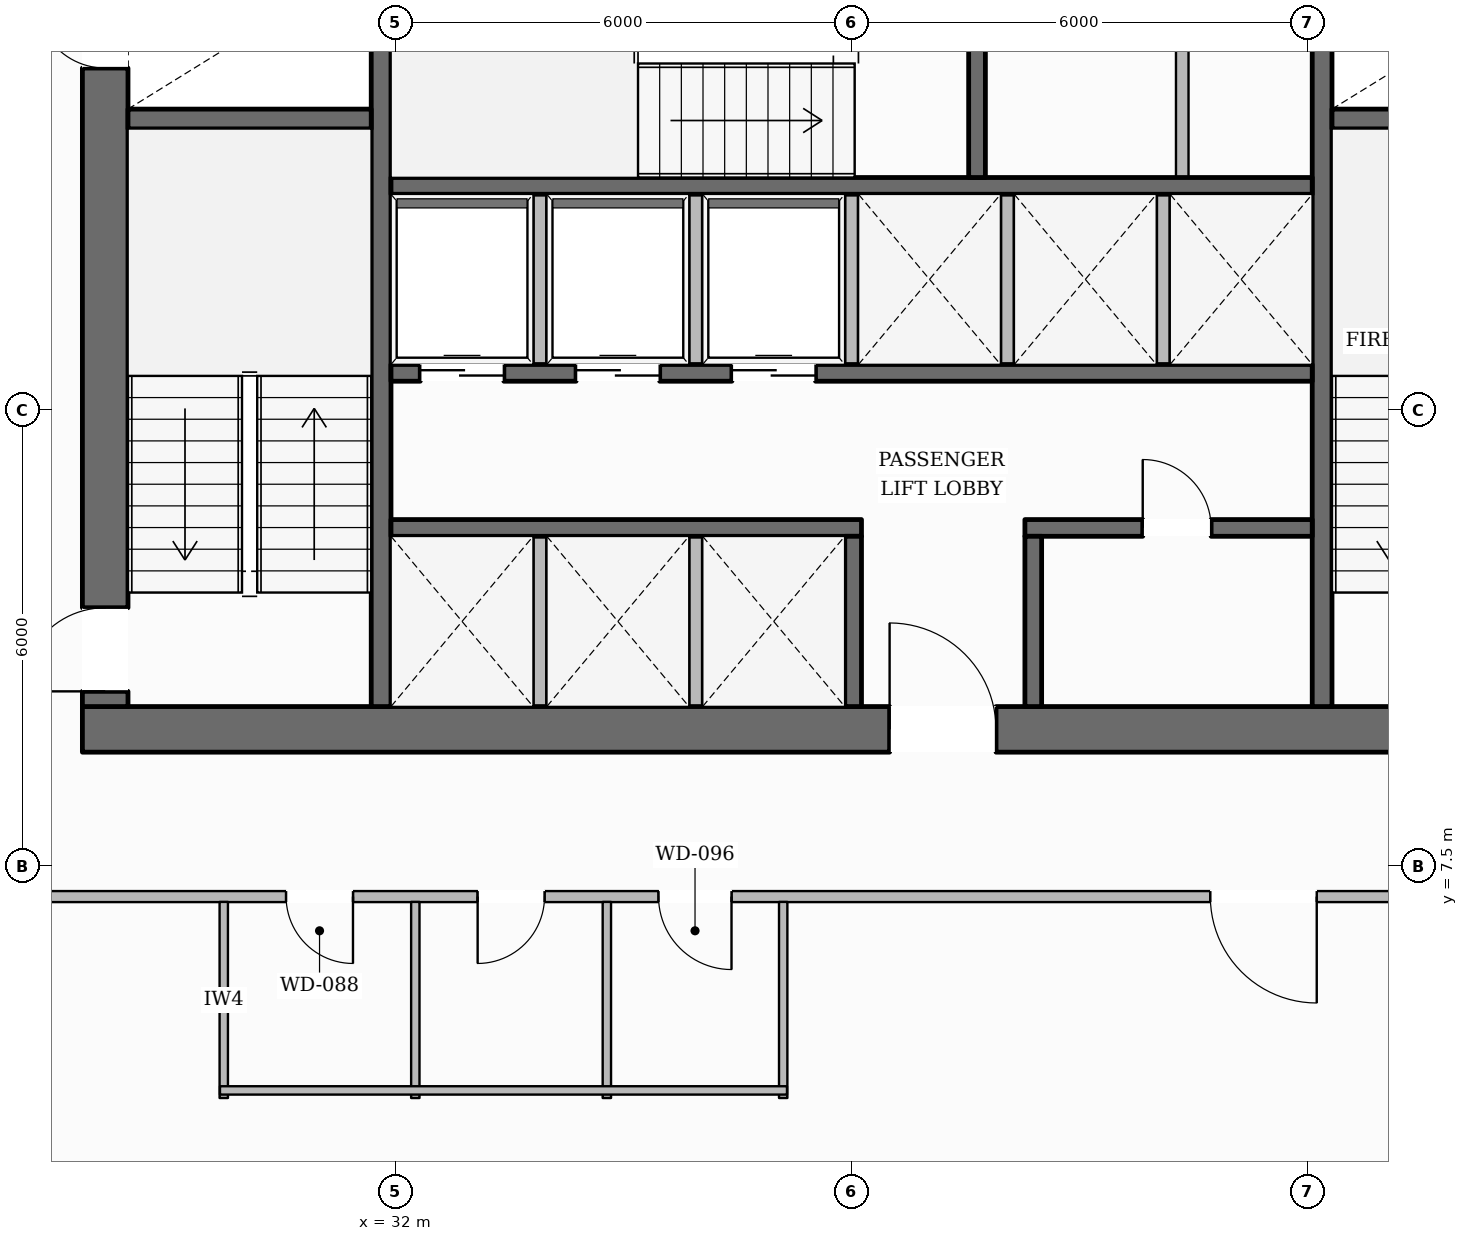
"""IFC4 building model, lengths in metres.
Left out: names, types, materials, properties, quantities, classifications, styles, units other than length and angle.
Written with IfcOpenShell. Run it as: python <this file> out.ifc"""

import sys

from ifc_helpers import new_model, si_unit, direction, frame, frame_2d, origin, place, context, subcontext, project, spatial, rectangle, extrude, element, fill, save


model = new_model("IFC4")
c1 = context("Model", 3, precision=1e-05, world=origin(), true_north=direction((0.0, 1.0)))
c2 = subcontext(c1, "Body", "Model", "MODEL_VIEW")
j1 = project(units=[si_unit("LENGTHUNIT", "METRE"), si_unit("PLANEANGLEUNIT", "RADIAN")], contexts=[c1])
p1 = place(None, origin())
s1 = spatial("IfcSite", under=j1, at=p1, CompositionType="ELEMENT")
p2 = place(p1, origin())
s2 = spatial("IfcBuilding", under=s1, at=p2, CompositionType="ELEMENT")
p3 = place(p2, frame((0.0, 0.0, 9.85)))
s3 = spatial("IfcBuildingStorey", under=s2, at=p3, CompositionType="ELEMENT", Elevation=9.85)
p4 = place(p3, frame((27.88, 9.3, 0.0), z_axis=(0.0, 0.0, 1.0), x_axis=(1.0, 0.0, 0.0)))
e1 = element("IfcWall", 1, at=p4, inside=s3, PredefinedType="SOLIDWALL", context=c2, shape_type="SweptSolid", body=[
    extrude(rectangle(XDim=20.24, YDim=0.6, at=frame_2d((10.12, 0.0))), origin(), (0.0, 0.0, 1.0), 3.59),
])
p5 = place(p4, frame((10.62, 0.0, 0.0)))
e2 = element("IfcOpeningElement", 2, at=p5, cuts=e1, PredefinedType="OPENING", context=c2, shape_type="SweptSolid", body=[
    extrude(rectangle(XDim=1.4, YDim=2.2, at=frame_2d((0.7, 1.1))), frame((0.0, 0.31, 0.0), z_axis=(0.0, -1.0, 0.0), x_axis=(1.0, 0.0, 0.0)), (0.0, 0.0, 1.0), 0.62),
])
p6 = place(p3, frame((28.18, 9.6, 0.0), z_axis=(0.0, 0.0, 1.0), x_axis=(0.0, 1.0, 0.0)))
e3 = element("IfcWall", 3, at=p6, inside=s3, PredefinedType="SOLIDWALL", context=c2, shape_type="SweptSolid", body=[
    extrude(rectangle(XDim=13.0, YDim=0.6, at=frame_2d((6.5, 0.0))), origin(), (0.0, 0.0, 1.0), 3.59),
])
p7 = place(p6, frame((0.2, 0.0, 0.0)))
e4 = element("IfcOpeningElement", 4, at=p7, cuts=e3, PredefinedType="OPENING", context=c2, shape_type="SweptSolid", body=[
    extrude(rectangle(XDim=1.1, YDim=2.15, at=frame_2d((0.55, 1.075))), frame((0.0, 0.31, 0.0), z_axis=(0.0, -1.0, 0.0), x_axis=(1.0, 0.0, 0.0)), (0.0, 0.0, 1.0), 0.62),
])
p8 = place(p6, frame((8.4, 0.0, 0.0)))
e5 = element("IfcOpeningElement", 5, at=p8, cuts=e3, PredefinedType="OPENING", context=c2, shape_type="SweptSolid", body=[
    extrude(rectangle(XDim=0.9, YDim=2.1, at=frame_2d((0.45, 1.05))), frame((0.0, 0.31, 0.0), z_axis=(0.0, -1.0, 0.0), x_axis=(1.0, 0.0, 0.0)), (0.0, 0.0, 1.0), 0.62),
])
p9 = place(p3, frame((31.81, 9.6, 0.0), z_axis=(0.0, 0.0, 1.0), x_axis=(0.0, 1.0, 0.0)))
e6 = element("IfcWall", 6, at=p9, inside=s3, PredefinedType="SHEAR", context=c2, shape_type="SweptSolid", body=[
    extrude(rectangle(XDim=13.0, YDim=0.26, at=frame_2d((6.5, 0.0))), origin(), (0.0, 0.0, 1.0), 3.59),
])
p10 = place(p9, frame((10.925, 0.0, 0.0)))
e7 = element("IfcOpeningElement", 7, at=p10, cuts=e6, PredefinedType="OPENING", context=c2, shape_type="SweptSolid", body=[
    extrude(rectangle(XDim=1.25, YDim=2.25, at=frame_2d((0.625, 1.125))), frame((0.0, 0.14, 0.0), z_axis=(0.0, -1.0, 0.0), x_axis=(1.0, 0.0, 0.0)), (0.0, 0.0, 1.0), 0.28),
])
p11 = place(p3, frame((44.19, 9.6, 0.0), z_axis=(0.0, 0.0, 1.0), x_axis=(0.0, 1.0, 0.0)))
e8 = element("IfcWall", 8, at=p11, inside=s3, PredefinedType="SHEAR", context=c2, shape_type="SweptSolid", body=[
    extrude(rectangle(XDim=13.0, YDim=0.26, at=frame_2d((6.5, 0.0))), origin(), (0.0, 0.0, 1.0), 3.59),
])
p12 = place(p11, frame((10.925, 0.0, 0.0)))
e9 = element("IfcOpeningElement", 9, at=p12, cuts=e8, PredefinedType="OPENING", context=c2, shape_type="SweptSolid", body=[
    extrude(rectangle(XDim=1.25, YDim=2.25, at=frame_2d((0.625, 1.125))), frame((0.0, 0.14, 0.0), z_axis=(0.0, -1.0, 0.0), x_axis=(1.0, 0.0, 0.0)), (0.0, 0.0, 1.0), 0.28),
])
for number, where, z_axis, x_axis in (
    (10, (28.48, 17.33, 0.0), (0.0, 0.0, 1.0), (1.0, 0.0, 0.0)),
    (11, (44.32, 17.33, 0.0), (0.0, 0.0, 1.0), (1.0, 0.0, 0.0)),
):
    element("IfcWall", number, at=place(p3, frame(where, z_axis=z_axis, x_axis=x_axis)), inside=s3, PredefinedType="SHEAR", context=c2, shape_type="SweptSolid", body=[
        extrude(rectangle(XDim=3.2, YDim=0.26, at=frame_2d((1.6, 0.0))), origin(), (0.0, 0.0, 1.0), 3.59),
    ])
p13 = place(p3, frame((31.94, 16.45, 0.0), z_axis=(0.0, 0.0, 1.0), x_axis=(1.0, 0.0, 0.0)))
e12 = element("IfcWall", 12, at=p13, inside=s3, PredefinedType="SOLIDWALL", context=c2, shape_type="SweptSolid", body=[
    extrude(rectangle(XDim=12.12, YDim=0.22, at=frame_2d((6.06, 0.0))), origin(), (0.0, 0.0, 1.0), 3.59),
])
p14 = place(p3, frame((39.65, 16.56, 0.0), z_axis=(0.0, 0.0, 1.0), x_axis=(0.0, 1.0, 0.0)))
e13 = element("IfcWall", 13, at=p14, inside=s3, PredefinedType="SOLIDWALL", context=c2, shape_type="SweptSolid", body=[
    extrude(rectangle(XDim=3.2, YDim=0.22, at=frame_2d((1.6, 0.0))), origin(), (0.0, 0.0, 1.0), 3.59),
])
p15 = place(p3, frame((31.94, 13.99, 0.0), z_axis=(0.0, 0.0, 1.0), x_axis=(1.0, 0.0, 0.0)))
e14 = element("IfcWall", 14, at=p15, inside=s3, PredefinedType="SOLIDWALL", context=c2, shape_type="SweptSolid", body=[
    extrude(rectangle(XDim=12.12, YDim=0.22, at=frame_2d((6.06, 0.0))), origin(), (0.0, 0.0, 1.0), 3.59),
])
p16 = place(p15, frame((0.385, 0.0, 0.0)))
e15 = element("IfcOpeningElement", 15, at=p16, cuts=e14, PredefinedType="OPENING", context=c2, shape_type="SweptSolid", body=[
    extrude(rectangle(XDim=1.1, YDim=2.2, at=frame_2d((0.55, 1.1))), frame((0.0, 0.12, 0.0), z_axis=(0.0, -1.0, 0.0), x_axis=(1.0, 0.0, 0.0)), (0.0, 0.0, 1.0), 0.24),
])
p17 = place(p15, frame((2.435, 0.0, 0.0)))
e16 = element("IfcOpeningElement", 16, at=p17, cuts=e14, PredefinedType="OPENING", context=c2, shape_type="SweptSolid", body=[
    extrude(rectangle(XDim=1.1, YDim=2.2, at=frame_2d((0.55, 1.1))), frame((0.0, 0.12, 0.0), z_axis=(0.0, -1.0, 0.0), x_axis=(1.0, 0.0, 0.0)), (0.0, 0.0, 1.0), 0.24),
])
p18 = place(p15, frame((4.485, 0.0, 0.0)))
e17 = element("IfcOpeningElement", 17, at=p18, cuts=e14, PredefinedType="OPENING", context=c2, shape_type="SweptSolid", body=[
    extrude(rectangle(XDim=1.1, YDim=2.2, at=frame_2d((0.55, 1.1))), frame((0.0, 0.12, 0.0), z_axis=(0.0, -1.0, 0.0), x_axis=(1.0, 0.0, 0.0)), (0.0, 0.0, 1.0), 0.24),
])
p19 = place(p3, frame((31.94, 11.95, 0.0), z_axis=(0.0, 0.0, 1.0), x_axis=(1.0, 0.0, 0.0)))
e18 = element("IfcWall", 18, at=p19, inside=s3, PredefinedType="SOLIDWALL", context=c2, shape_type="SweptSolid", body=[
    extrude(rectangle(XDim=6.19, YDim=0.22, at=frame_2d((3.095, 0.0))), origin(), (0.0, 0.0, 1.0), 3.59),
])
p20 = place(p3, frame((40.28, 11.95, 0.0), z_axis=(0.0, 0.0, 1.0), x_axis=(1.0, 0.0, 0.0)))
e19 = element("IfcWall", 19, at=p20, inside=s3, PredefinedType="SOLIDWALL", context=c2, shape_type="SweptSolid", body=[
    extrude(rectangle(XDim=3.78, YDim=0.22, at=frame_2d((1.89, 0.0))), origin(), (0.0, 0.0, 1.0), 3.59),
])
p21 = place(p20, frame((1.55, 0.0, 0.0)))
e20 = element("IfcOpeningElement", 20, at=p21, cuts=e19, PredefinedType="OPENING", context=c2, shape_type="SweptSolid", body=[
    extrude(rectangle(XDim=0.9, YDim=2.1, at=frame_2d((0.45, 1.05))), frame((0.0, 0.12, 0.0), z_axis=(0.0, -1.0, 0.0), x_axis=(1.0, 0.0, 0.0)), (0.0, 0.0, 1.0), 0.24),
])
for number, where, z_axis, x_axis in (
    (21, (38.02, 9.6, 0.0), (0.0, 0.0, 1.0), (0.0, 1.0, 0.0)),
    (22, (40.39, 9.6, 0.0), (0.0, 0.0, 1.0), (0.0, 1.0, 0.0)),
):
    element("IfcWall", number, at=place(p3, frame(where, z_axis=z_axis, x_axis=x_axis)), inside=s3, PredefinedType="SOLIDWALL", context=c2, shape_type="SweptSolid", body=[
        extrude(rectangle(XDim=2.24, YDim=0.22, at=frame_2d((1.12, 0.0))), origin(), (0.0, 0.0, 1.0), 3.59),
    ])
p22 = place(p3, frame((13.044, 15.027, 0.0), z_axis=(0.0, 0.0, 1.0), x_axis=(0.500616330433, 0.865669272704, 0.0)))
e23 = element("IfcWall", 23, at=p22, inside=s3, PredefinedType="STANDARD", context=c2, shape_type="SweptSolid", body=[
    extrude(rectangle(XDim=33.487, YDim=0.38, at=frame_2d((16.743, 0.0))), origin(), (0.0, 0.0, 1.0), 2.97),
])
p23 = place(p22, frame((7.972, 0.0, 0.0)))
e24 = element("IfcOpeningElement", 24, at=p23, cuts=e23, PredefinedType="OPENING", context=c2, shape_type="SweptSolid", body=[
    extrude(rectangle(XDim=1.0, YDim=2.2, at=frame_2d((0.5, 1.1))), frame((0.0, 0.2, 0.0), z_axis=(0.0, -1.0, 0.0), x_axis=(1.0, 0.0, 0.0)), (0.0, 0.0, 1.0), 0.4),
])
p24 = place(p22, frame((29.475, 0.0, 0.65)))
e25 = element("IfcOpeningElement", 25, at=p24, cuts=e23, PredefinedType="OPENING", context=c2, shape_type="SweptSolid", body=[
    extrude(rectangle(XDim=1.65, YDim=1.75, at=frame_2d((0.825, 0.875))), frame((0.0, 0.2, 0.0), z_axis=(0.0, -1.0, 0.0), x_axis=(1.0, 0.0, 0.0)), (0.0, 0.0, 1.0), 0.4),
])
p25 = place(p22, frame((24.052, 0.0, 0.65)))
e26 = element("IfcOpeningElement", 26, at=p25, cuts=e23, PredefinedType="OPENING", context=c2, shape_type="SweptSolid", body=[
    extrude(rectangle(XDim=1.65, YDim=1.75, at=frame_2d((0.825, 0.875))), frame((0.0, 0.2, 0.0), z_axis=(0.0, -1.0, 0.0), x_axis=(1.0, 0.0, 0.0)), (0.0, 0.0, 1.0), 0.4),
])
p26 = place(p22, frame((18.63, 0.0, 0.65)))
e27 = element("IfcOpeningElement", 27, at=p26, cuts=e23, PredefinedType="OPENING", context=c2, shape_type="SweptSolid", body=[
    extrude(rectangle(XDim=1.65, YDim=1.75, at=frame_2d((0.825, 0.875))), frame((0.0, 0.2, 0.0), z_axis=(0.0, -1.0, 0.0), x_axis=(1.0, 0.0, 0.0)), (0.0, 0.0, 1.0), 0.4),
])
p27 = place(p22, frame((2.362, 0.0, 0.65)))
e28 = element("IfcOpeningElement", 28, at=p27, cuts=e23, PredefinedType="OPENING", context=c2, shape_type="SweptSolid", body=[
    extrude(rectangle(XDim=1.65, YDim=1.75, at=frame_2d((0.825, 0.875))), frame((0.0, 0.2, 0.0), z_axis=(0.0, -1.0, 0.0), x_axis=(1.0, 0.0, 0.0)), (0.0, 0.0, 1.0), 0.4),
])
for number, where, z_axis, x_axis in (
    (29, (33.9, 9.6, 0.0), (0.0, 0.0, 1.0), (0.0, 1.0, 0.0)),
    (30, (35.95, 9.6, 0.0), (0.0, 0.0, 1.0), (0.0, 1.0, 0.0)),
    (31, (33.9, 14.1, 0.0), (0.0, 0.0, 1.0), (0.0, 1.0, 0.0)),
    (32, (35.95, 14.1, 0.0), (0.0, 0.0, 1.0), (0.0, 1.0, 0.0)),
    (33, (38.0, 14.1, 0.0), (0.0, 0.0, 1.0), (0.0, 1.0, 0.0)),
    (34, (40.05, 14.1, 0.0), (0.0, 0.0, 1.0), (0.0, 1.0, 0.0)),
    (35, (42.1, 14.1, 0.0), (0.0, 0.0, 1.0), (0.0, 1.0, 0.0)),
):
    element("IfcWall", number, at=place(p3, frame(where, z_axis=z_axis, x_axis=x_axis)), inside=s3, PredefinedType="PARTITIONING", context=c2, shape_type="SweptSolid", body=[
        extrude(rectangle(XDim=2.24, YDim=0.165, at=frame_2d((1.12, 0.0))), origin(), (0.0, 0.0, 1.0), 3.59),
    ])
p28 = place(p3, frame((42.35, 16.56, 0.0), z_axis=(0.0, 0.0, 1.0), x_axis=(0.0, 1.0, 0.0)))
e36 = element("IfcWall", 36, at=p28, inside=s3, PredefinedType="PARTITIONING", context=c2, shape_type="SweptSolid", body=[
    extrude(rectangle(XDim=3.2, YDim=0.165, at=frame_2d((1.6, 0.0))), origin(), (0.0, 0.0, 1.0), 3.59),
])
p29 = place(p3, frame((49.92, 7.1, 0.0), z_axis=(0.0, 0.0, 1.0), x_axis=(-1.0, 0.0, 0.0)))
e37 = element("IfcWall", 37, at=p29, inside=s3, PredefinedType="PARTITIONING", context=c2, shape_type="SweptSolid", body=[
    extrude(rectangle(XDim=23.84, YDim=0.145, at=frame_2d((11.92, 0.0))), origin(), (0.0, 0.0, 1.0), 3.278),
])
p30 = place(p29, frame((18.48, 0.0, 0.0)))
e38 = element("IfcOpeningElement", 38, at=p30, cuts=e37, PredefinedType="OPENING", context=c2, shape_type="SweptSolid", body=[
    extrude(rectangle(XDim=0.88, YDim=2.1, at=frame_2d((0.44, 1.05))), frame((0.0, 0.083, 0.0), z_axis=(0.0, -1.0, 0.0), x_axis=(1.0, 0.0, 0.0)), (0.0, 0.0, 1.0), 0.165),
])
p31 = place(p29, frame((15.96, 0.0, 0.0)))
e39 = element("IfcOpeningElement", 39, at=p31, cuts=e37, PredefinedType="OPENING", context=c2, shape_type="SweptSolid", body=[
    extrude(rectangle(XDim=0.88, YDim=2.1, at=frame_2d((0.44, 1.05))), frame((0.0, 0.083, 0.0), z_axis=(0.0, -1.0, 0.0), x_axis=(1.0, 0.0, 0.0)), (0.0, 0.0, 1.0), 0.165),
])
p32 = place(p29, frame((13.5, 0.0, 0.0)))
e40 = element("IfcOpeningElement", 40, at=p32, cuts=e37, PredefinedType="OPENING", context=c2, shape_type="SweptSolid", body=[
    extrude(rectangle(XDim=0.96, YDim=2.1, at=frame_2d((0.48, 1.05))), frame((0.0, 0.083, 0.0), z_axis=(0.0, -1.0, 0.0), x_axis=(1.0, 0.0, 0.0)), (0.0, 0.0, 1.0), 0.165),
])
p33 = place(p29, frame((5.801, 0.0, 0.0)))
e41 = element("IfcOpeningElement", 41, at=p33, cuts=e37, PredefinedType="OPENING", context=c2, shape_type="SweptSolid", body=[
    extrude(rectangle(XDim=1.4, YDim=2.2, at=frame_2d((0.7, 1.1))), frame((0.0, 0.083, 0.0), z_axis=(0.0, -1.0, 0.0), x_axis=(1.0, 0.0, 0.0)), (0.0, 0.0, 1.0), 0.165),
])
p34 = place(p3, frame((29.74, 4.45, 0.0), z_axis=(0.0, 0.0, 1.0), x_axis=(0.0, 1.0, 0.0)))
e42 = element("IfcWall", 42, at=p34, inside=s3, PredefinedType="PLUMBINGWALL", context=c2, shape_type="SweptSolid", body=[
    extrude(rectangle(XDim=2.58, YDim=0.11, at=frame_2d((1.29, 0.0))), origin(), (0.0, 0.0, 1.0), 3.59),
])
p35 = place(p3, frame((32.26, 4.45, 0.0), z_axis=(0.0, 0.0, 1.0), x_axis=(0.0, 1.0, 0.0)))
e43 = element("IfcWall", 43, at=p35, inside=s3, PredefinedType="PLUMBINGWALL", context=c2, shape_type="SweptSolid", body=[
    extrude(rectangle(XDim=2.58, YDim=0.11, at=frame_2d((1.29, 0.0))), origin(), (0.0, 0.0, 1.0), 3.057),
])
for number, where, z_axis, x_axis in (
    (44, (34.78, 4.45, 0.0), (0.0, 0.0, 1.0), (0.0, 1.0, 0.0)),
    (45, (37.1, 4.45, 0.0), (0.0, 0.0, 1.0), (0.0, 1.0, 0.0)),
):
    element("IfcWall", number, at=place(p3, frame(where, z_axis=z_axis, x_axis=x_axis)), inside=s3, PredefinedType="PLUMBINGWALL", context=c2, shape_type="SweptSolid", body=[
        extrude(rectangle(XDim=2.58, YDim=0.11, at=frame_2d((1.29, 0.0))), origin(), (0.0, 0.0, 1.0), 3.59),
    ])
p36 = place(p3, frame((29.69, 4.55, 0.0), z_axis=(0.0, 0.0, 1.0), x_axis=(1.0, 0.0, 0.0)))
e46 = element("IfcWall", 46, at=p36, inside=s3, PredefinedType="PLUMBINGWALL", context=c2, shape_type="SweptSolid", body=[
    extrude(rectangle(XDim=7.46, YDim=0.11, at=frame_2d((3.73, 0.0))), origin(), (0.0, 0.0, 1.0), 3.59),
])
p37 = place(p7, origin())
e47 = element("IfcDoor", 47, at=p37, inside=s3, OperationType="SINGLE_SWING_LEFT", PredefinedType="DOOR", context=c2, shape_type="SweptSolid", body=[
    extrude(rectangle(XDim=1.1, YDim=2.15, at=frame_2d((0.55, 1.075))), frame((0.0, 0.025, 0.0), z_axis=(0.0, -1.0, 0.0), x_axis=(1.0, 0.0, 0.0)), (0.0, 0.0, 1.0), 0.05),
])
fill(e4, e47)
p38 = place(p8, origin())
e48 = element("IfcDoor", 48, at=p38, inside=s3, OperationType="SINGLE_SWING_RIGHT", PredefinedType="DOOR", context=c2, shape_type="SweptSolid", body=[
    extrude(rectangle(XDim=0.9, YDim=2.1, at=frame_2d((0.45, 1.05))), frame((0.0, 0.025, 0.0), z_axis=(0.0, -1.0, 0.0), x_axis=(1.0, 0.0, 0.0)), (0.0, 0.0, 1.0), 0.05),
])
fill(e5, e48)
p39 = place(p5, origin())
e49 = element("IfcDoor", 49, at=p39, inside=s3, OperationType="SINGLE_SWING_LEFT", PredefinedType="DOOR", context=c2, shape_type="SweptSolid", body=[
    extrude(rectangle(XDim=1.4, YDim=2.2, at=frame_2d((0.7, 1.1))), frame((0.0, 0.025, 0.0), z_axis=(0.0, -1.0, 0.0), x_axis=(1.0, 0.0, 0.0)), (0.0, 0.0, 1.0), 0.05),
])
fill(e2, e49)
p40 = place(p16, origin())
e50 = element("IfcDoor", 50, at=p40, inside=s3, OperationType="DOUBLE_DOOR_SLIDING", PredefinedType="DOOR", context=c2, shape_type="SweptSolid", body=[
    extrude(rectangle(XDim=1.1, YDim=2.2, at=frame_2d((0.55, 1.1))), frame((0.0, 0.025, 0.0), z_axis=(0.0, -1.0, 0.0), x_axis=(1.0, 0.0, 0.0)), (0.0, 0.0, 1.0), 0.05),
])
fill(e15, e50)
p41 = place(p17, origin())
e51 = element("IfcDoor", 51, at=p41, inside=s3, OperationType="DOUBLE_DOOR_SLIDING", PredefinedType="DOOR", context=c2, shape_type="SweptSolid", body=[
    extrude(rectangle(XDim=1.1, YDim=2.2, at=frame_2d((0.55, 1.1))), frame((0.0, 0.025, 0.0), z_axis=(0.0, -1.0, 0.0), x_axis=(1.0, 0.0, 0.0)), (0.0, 0.0, 1.0), 0.05),
])
fill(e16, e51)
p42 = place(p18, origin())
e52 = element("IfcDoor", 52, at=p42, inside=s3, OperationType="DOUBLE_DOOR_SLIDING", PredefinedType="DOOR", context=c2, shape_type="SweptSolid", body=[
    extrude(rectangle(XDim=1.1, YDim=2.2, at=frame_2d((0.55, 1.1))), frame((0.0, 0.025, 0.0), z_axis=(0.0, -1.0, 0.0), x_axis=(1.0, 0.0, 0.0)), (0.0, 0.0, 1.0), 0.05),
])
fill(e17, e52)
p43 = place(p21, origin())
e53 = element("IfcDoor", 53, at=p43, inside=s3, OperationType="SINGLE_SWING_LEFT", PredefinedType="DOOR", context=c2, shape_type="SweptSolid", body=[
    extrude(rectangle(XDim=0.9, YDim=2.1, at=frame_2d((0.45, 1.05))), frame((0.0, 0.025, 0.0), z_axis=(0.0, -1.0, 0.0), x_axis=(1.0, 0.0, 0.0)), (0.0, 0.0, 1.0), 0.05),
])
fill(e20, e53)
p44 = place(p30, origin())
e54 = element("IfcDoor", 54, at=p44, inside=s3, OperationType="SINGLE_SWING_LEFT", PredefinedType="DOOR", context=c2, shape_type="SweptSolid", body=[
    extrude(rectangle(XDim=0.88, YDim=2.1, at=frame_2d((0.44, 1.05))), frame((0.0, 0.025, 0.0), z_axis=(0.0, -1.0, 0.0), x_axis=(1.0, 0.0, 0.0)), (0.0, 0.0, 1.0), 0.05),
])
fill(e38, e54)
p45 = place(p31, origin())
e55 = element("IfcDoor", 55, at=p45, inside=s3, OperationType="SINGLE_SWING_RIGHT", PredefinedType="DOOR", context=c2, shape_type="SweptSolid", body=[
    extrude(rectangle(XDim=0.88, YDim=2.1, at=frame_2d((0.44, 1.05))), frame((0.0, 0.025, 0.0), z_axis=(0.0, -1.0, 0.0), x_axis=(1.0, 0.0, 0.0)), (0.0, 0.0, 1.0), 0.05),
])
fill(e39, e55)
p46 = place(p32, origin())
e56 = element("IfcDoor", 56, at=p46, inside=s3, OperationType="SINGLE_SWING_LEFT", PredefinedType="DOOR", context=c2, shape_type="SweptSolid", body=[
    extrude(rectangle(XDim=0.96, YDim=2.1, at=frame_2d((0.48, 1.05))), frame((0.0, 0.025, 0.0), z_axis=(0.0, -1.0, 0.0), x_axis=(1.0, 0.0, 0.0)), (0.0, 0.0, 1.0), 0.05),
])
fill(e40, e56)
p47 = place(p33, origin())
e57 = element("IfcDoor", 57, at=p47, inside=s3, OperationType="SINGLE_SWING_LEFT", PredefinedType="DOOR", context=c2, shape_type="SweptSolid", body=[
    extrude(rectangle(XDim=1.4, YDim=2.2, at=frame_2d((0.7, 1.1))), frame((0.0, 0.025, 0.0), z_axis=(0.0, -1.0, 0.0), x_axis=(1.0, 0.0, 0.0)), (0.0, 0.0, 1.0), 0.05),
])
fill(e41, e57)
save(model, sys.argv[1])
